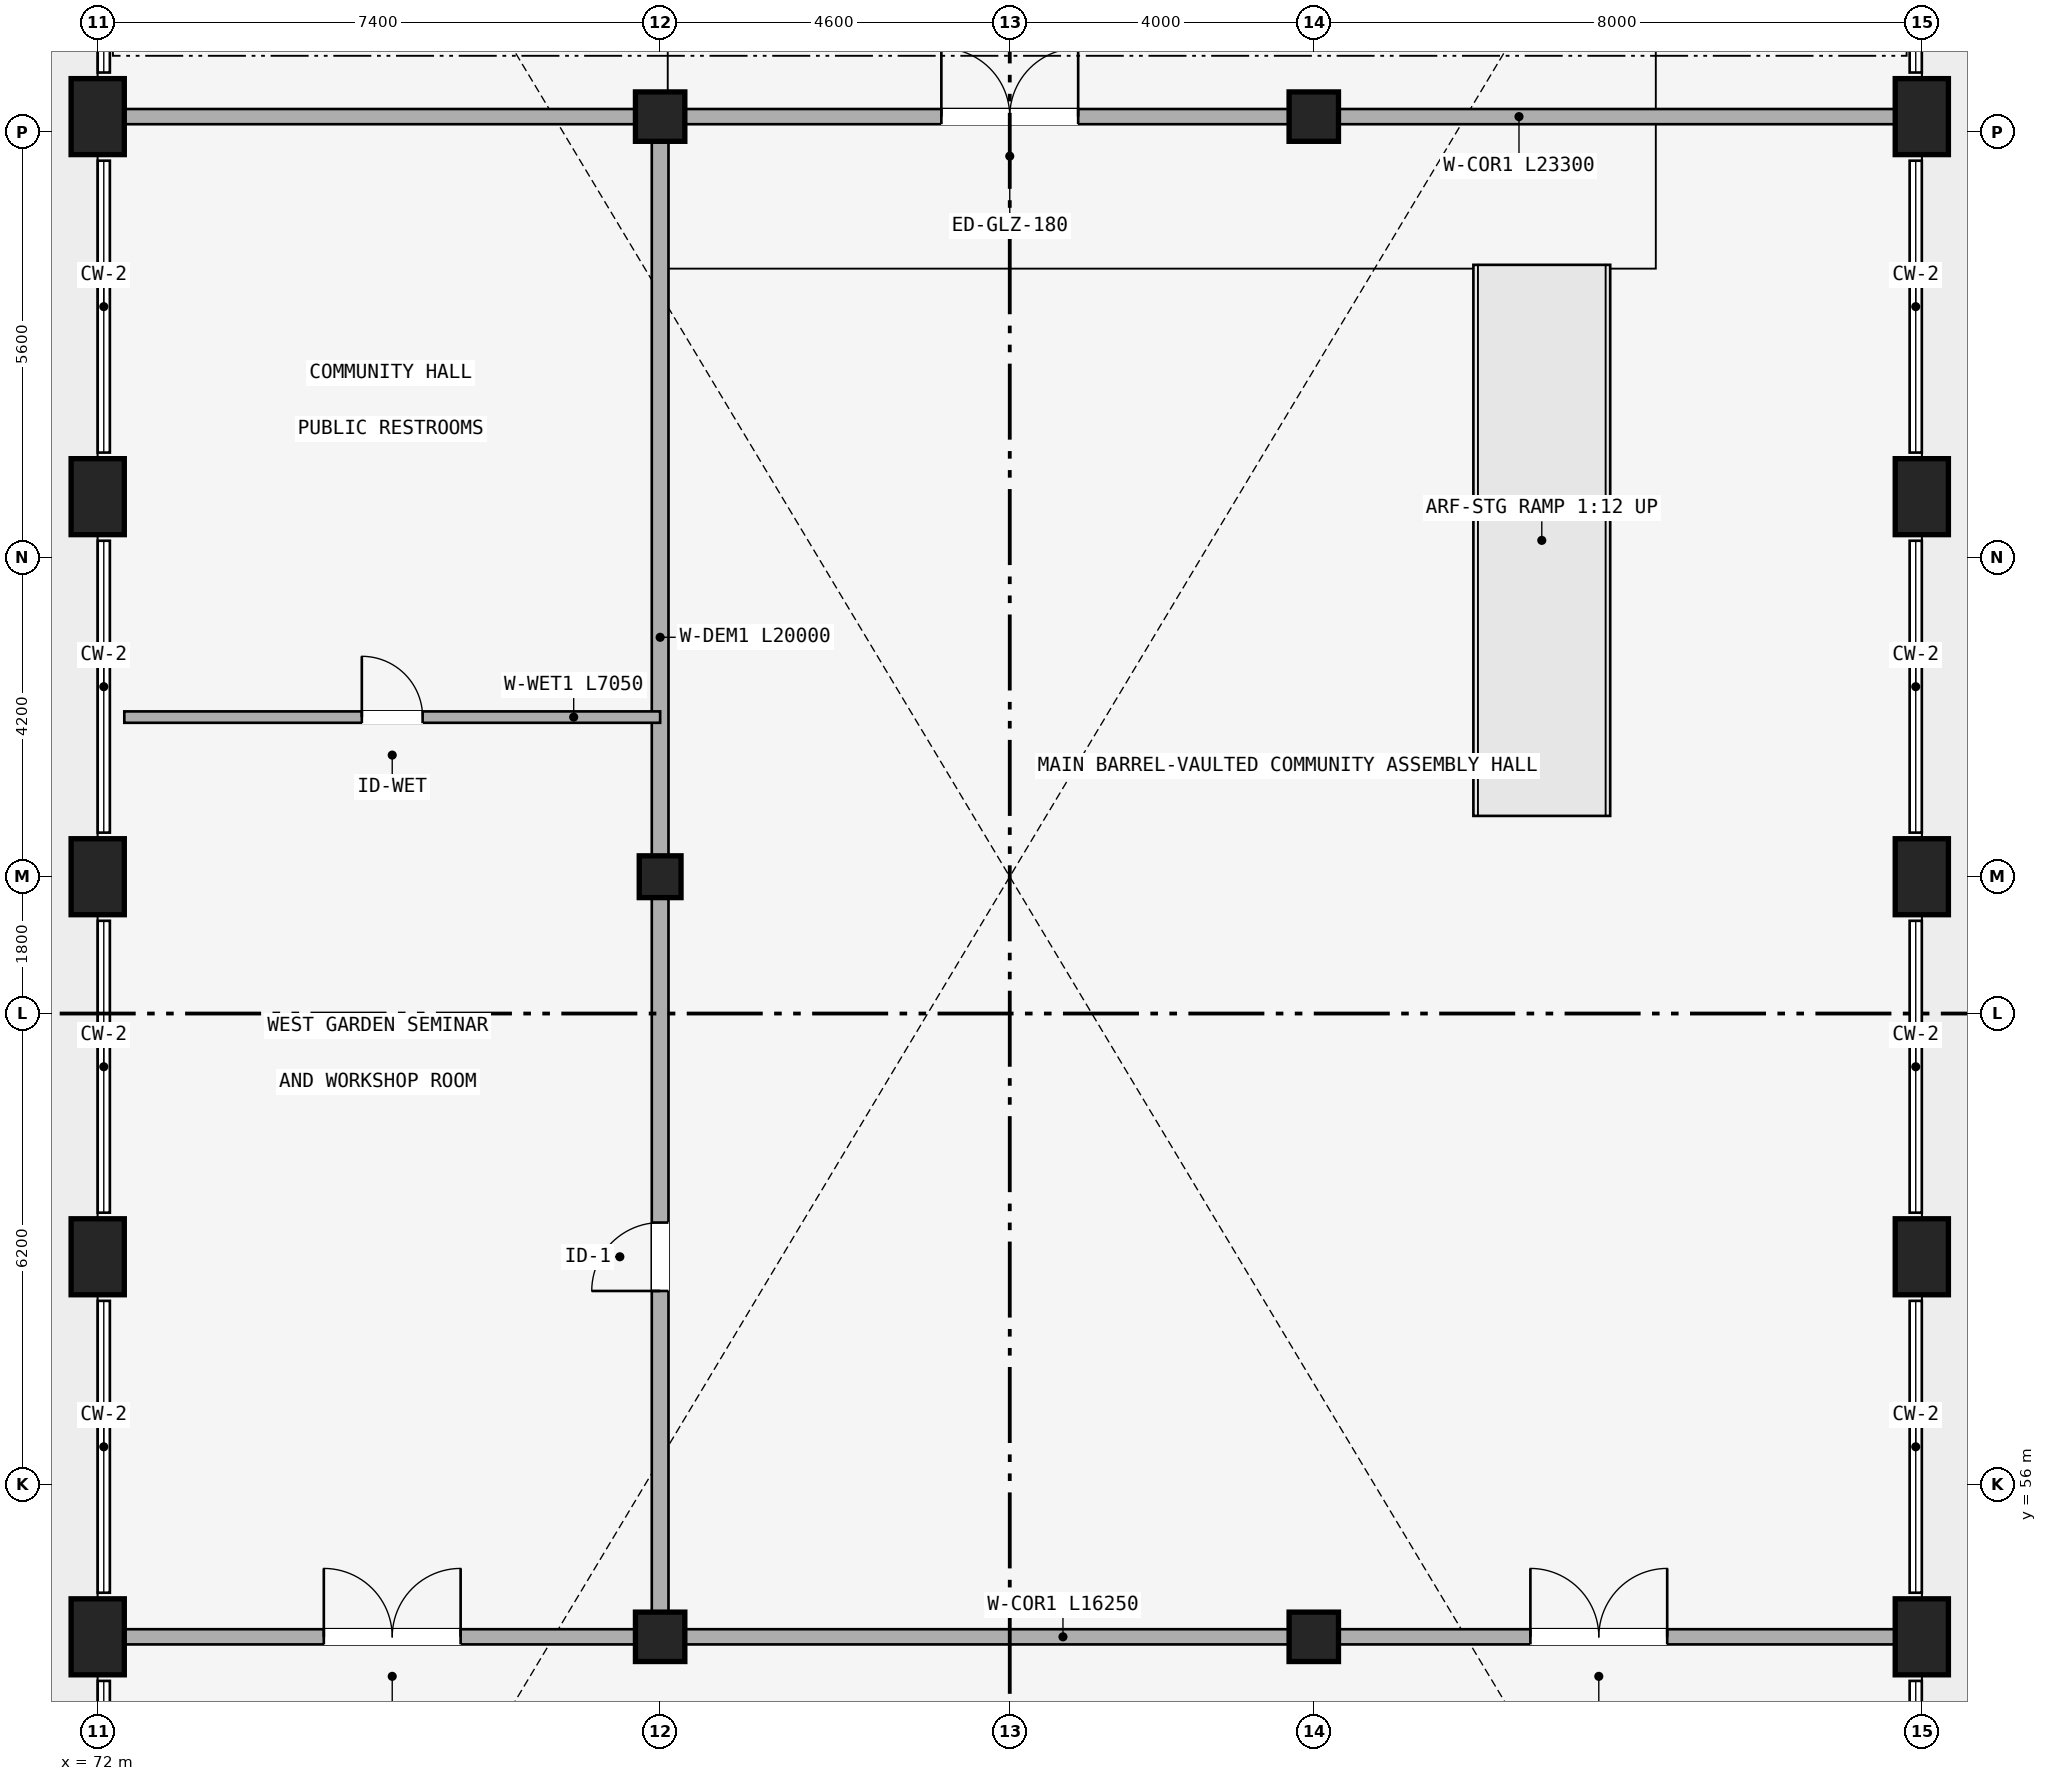
"""IFC4 building model, lengths in metres.
Left out: names, types, materials, properties, quantities, classifications, styles, units other than length and angle.
Written with IfcOpenShell. Run it as: python <this file> out.ifc"""

import sys

from ifc_helpers import new_model, si_unit, direction, frame, frame_2d, origin, origin_2d, place, context, subcontext, project, spatial, rectangle, extrude, element, fill, save


model = new_model("IFC4")
c1 = context("Model", 3, precision=1e-05, world=origin(), true_north=direction((0.0, 1.0)))
c2 = subcontext(c1, "Body", "Model", "MODEL_VIEW")
j1 = project(units=[si_unit("LENGTHUNIT", "METRE"), si_unit("PLANEANGLEUNIT", "RADIAN")], contexts=[c1])
p1 = place(None, origin())
s1 = spatial("IfcSite", under=j1, at=p1, CompositionType="ELEMENT")
p2 = place(p1, origin())
s2 = spatial("IfcBuilding", under=s1, at=p2, CompositionType="ELEMENT")
p3 = place(p2, origin())
s3 = spatial("IfcBuildingStorey", under=s2, at=p3, CompositionType="ELEMENT", Elevation=0.0)
for number, where, z_axis, x_axis in (
    (1, (72.0, 54.0, 0.0), (0.0, 0.0, 1.0), (1.0, 0.0, 0.0)),
    (2, (96.0, 54.0, 0.0), (0.0, 0.0, 1.0), (1.0, 0.0, 0.0)),
    (3, (72.0, 59.0, 0.0), (0.0, 0.0, 1.0), (1.0, 0.0, 0.0)),
    (4, (96.0, 59.0, 0.0), (0.0, 0.0, 1.0), (1.0, 0.0, 0.0)),
    (5, (72.0, 64.0, 0.0), (0.0, 0.0, 1.0), (1.0, 0.0, 0.0)),
    (6, (96.0, 64.0, 0.0), (0.0, 0.0, 1.0), (1.0, 0.0, 0.0)),
    (7, (72.0, 69.0, 0.0), (0.0, 0.0, 1.0), (1.0, 0.0, 0.0)),
    (8, (96.0, 69.0, 0.0), (0.0, 0.0, 1.0), (1.0, 0.0, 0.0)),
    (9, (72.0, 74.0, 0.0), (0.0, 0.0, 1.0), (1.0, 0.0, 0.0)),
    (10, (96.0, 74.0, 0.0), (0.0, 0.0, 1.0), (1.0, 0.0, 0.0)),
):
    element("IfcColumn", number, at=place(p3, frame(where, z_axis=z_axis, x_axis=x_axis)), inside=s3, PredefinedType="COLUMN", context=c2, shape_type="SweptSolid", body=[
        extrude(rectangle(XDim=0.7, YDim=1.0, at=origin_2d()), origin(), (0.0, 0.0, 1.0), 4.5),
    ])
for number, where, z_axis, x_axis in (
    (11, (79.4, 54.0, 0.0), (0.0, 0.0, 1.0), (1.0, 0.0, 0.0)),
    (12, (88.0, 54.0, 0.0), (0.0, 0.0, 1.0), (1.0, 0.0, 0.0)),
    (13, (79.4, 74.0, 0.0), (0.0, 0.0, 1.0), (1.0, 0.0, 0.0)),
    (14, (88.0, 74.0, 0.0), (0.0, 0.0, 1.0), (1.0, 0.0, 0.0)),
):
    element("IfcColumn", number, at=place(p3, frame(where, z_axis=z_axis, x_axis=x_axis)), inside=s3, PredefinedType="COLUMN", context=c2, shape_type="SweptSolid", body=[
        extrude(rectangle(XDim=0.65, YDim=0.65, at=origin_2d()), origin(), (0.0, 0.0, 1.0), 4.25),
    ])
p4 = place(p3, frame((79.4, 64.0, 0.0), z_axis=(0.0, 0.0, 1.0), x_axis=(1.0, 0.0, 0.0)))
e15 = element("IfcColumn", 15, at=p4, inside=s3, PredefinedType="COLUMN", context=c2, shape_type="SweptSolid", body=[
    extrude(rectangle(XDim=0.55, YDim=0.55, at=origin_2d()), origin(), (0.0, 0.0, 1.0), 4.25),
])
p5 = place(p3, frame((72.35, 54.0, 0.0), z_axis=(0.0, 0.0, 1.0), x_axis=(1.0, 0.0, 0.0)))
e16 = element("IfcWall", 16, at=p5, inside=s3, PredefinedType="STANDARD", context=c2, shape_type="SweptSolid", body=[
    extrude(rectangle(XDim=7.05, YDim=0.2, at=frame_2d((3.525, 0.0))), origin(), (0.0, 0.0, 1.0), 3.492),
])
p6 = place(p5, frame((2.625, 0.0, 0.0)))
e17 = element("IfcOpeningElement", 17, at=p6, cuts=e16, PredefinedType="OPENING", context=c2, shape_type="SweptSolid", body=[
    extrude(rectangle(XDim=1.8, YDim=2.2, at=frame_2d((0.9, 1.1))), frame((0.0, 0.11, 0.0), z_axis=(0.0, -1.0, 0.0), x_axis=(1.0, 0.0, 0.0)), (0.0, 0.0, 1.0), 0.22),
])
p7 = place(p3, frame((79.4, 54.0, 0.0), z_axis=(0.0, 0.0, 1.0), x_axis=(1.0, 0.0, 0.0)))
e18 = element("IfcWall", 18, at=p7, inside=s3, PredefinedType="STANDARD", context=c2, shape_type="SweptSolid", body=[
    extrude(rectangle(XDim=16.25, YDim=0.2, at=frame_2d((8.125, 0.0))), origin(), (0.0, 0.0, 1.0), 3.492),
])
p8 = place(p7, frame((11.45, 0.0, 0.0)))
e19 = element("IfcOpeningElement", 19, at=p8, cuts=e18, PredefinedType="OPENING", context=c2, shape_type="SweptSolid", body=[
    extrude(rectangle(XDim=1.8, YDim=2.2, at=frame_2d((0.9, 1.1))), frame((0.0, 0.11, 0.0), z_axis=(0.0, -1.0, 0.0), x_axis=(1.0, 0.0, 0.0)), (0.0, 0.0, 1.0), 0.22),
])
p9 = place(p3, frame((79.4, 54.0, 0.0), z_axis=(0.0, 0.0, 1.0), x_axis=(0.0, 1.0, 0.0)))
e20 = element("IfcWall", 20, at=p9, inside=s3, PredefinedType="STANDARD", context=c2, shape_type="SweptSolid", body=[
    extrude(rectangle(XDim=20.0, YDim=0.22, at=frame_2d((10.0, 0.0))), origin(), (0.0, 0.0, 1.0), 3.492),
])
p10 = place(p9, frame((4.55, 0.0, 0.0)))
e21 = element("IfcOpeningElement", 21, at=p10, cuts=e20, PredefinedType="OPENING", context=c2, shape_type="SweptSolid", body=[
    extrude(rectangle(XDim=0.9, YDim=2.1, at=frame_2d((0.45, 1.05))), frame((0.0, 0.12, 0.0), z_axis=(0.0, -1.0, 0.0), x_axis=(1.0, 0.0, 0.0)), (0.0, 0.0, 1.0), 0.24),
])
p11 = place(p3, frame((72.35, 66.1, 0.0), z_axis=(0.0, 0.0, 1.0), x_axis=(1.0, 0.0, 0.0)))
e22 = element("IfcWall", 22, at=p11, inside=s3, PredefinedType="PLUMBINGWALL", context=c2, shape_type="SweptSolid", body=[
    extrude(rectangle(XDim=7.05, YDim=0.15, at=frame_2d((3.525, 0.0))), origin(), (0.0, 0.0, 1.0), 3.492),
])
p12 = place(p11, frame((3.125, 0.0, 0.0)))
e23 = element("IfcOpeningElement", 23, at=p12, cuts=e22, PredefinedType="OPENING", context=c2, shape_type="SweptSolid", body=[
    extrude(rectangle(XDim=0.8, YDim=2.1, at=frame_2d((0.4, 1.05))), frame((0.0, 0.085, 0.0), z_axis=(0.0, -1.0, 0.0), x_axis=(1.0, 0.0, 0.0)), (0.0, 0.0, 1.0), 0.17),
])
p13 = place(p3, frame((72.35, 74.0, 0.0), z_axis=(0.0, 0.0, 1.0), x_axis=(1.0, 0.0, 0.0)))
e24 = element("IfcWall", 24, at=p13, inside=s3, PredefinedType="STANDARD", context=c2, shape_type="SweptSolid", body=[
    extrude(rectangle(XDim=23.3, YDim=0.2, at=frame_2d((11.65, 0.0))), origin(), (0.0, 0.0, 1.0), 3.492),
])
p14 = place(p13, frame((10.75, 0.0, 0.0)))
e25 = element("IfcOpeningElement", 25, at=p14, cuts=e24, PredefinedType="OPENING", context=c2, shape_type="SweptSolid", body=[
    extrude(rectangle(XDim=1.8, YDim=2.2, at=frame_2d((0.9, 1.1))), frame((0.0, 0.11, 0.0), z_axis=(0.0, -1.0, 0.0), x_axis=(1.0, 0.0, 0.0)), (0.0, 0.0, 1.0), 0.22),
])
p15 = place(p6, origin())
e26 = element("IfcDoor", 26, at=p15, inside=s3, OperationType="DOUBLE_DOOR_SINGLE_SWING", PredefinedType="DOOR", context=c2, shape_type="SweptSolid", body=[
    extrude(rectangle(XDim=1.8, YDim=2.2, at=frame_2d((0.9, 1.1))), frame((0.0, 0.025, 0.0), z_axis=(0.0, -1.0, 0.0), x_axis=(1.0, 0.0, 0.0)), (0.0, 0.0, 1.0), 0.05),
])
fill(e17, e26)
p16 = place(p8, origin())
e27 = element("IfcDoor", 27, at=p16, inside=s3, OperationType="DOUBLE_DOOR_SINGLE_SWING", PredefinedType="DOOR", context=c2, shape_type="SweptSolid", body=[
    extrude(rectangle(XDim=1.8, YDim=2.2, at=frame_2d((0.9, 1.1))), frame((0.0, 0.025, 0.0), z_axis=(0.0, -1.0, 0.0), x_axis=(1.0, 0.0, 0.0)), (0.0, 0.0, 1.0), 0.05),
])
fill(e19, e27)
p17 = place(p10, frame((0.9, 0.0, 0.0), z_axis=(0.0, 0.0, 1.0), x_axis=(-1.0, 0.0, 0.0)))
e28 = element("IfcDoor", 28, at=p17, inside=s3, OperationType="SINGLE_SWING_RIGHT", PredefinedType="DOOR", context=c2, shape_type="SweptSolid", body=[
    extrude(rectangle(XDim=0.9, YDim=2.1, at=frame_2d((0.45, 1.05))), frame((0.0, 0.025, 0.0), z_axis=(0.0, -1.0, 0.0), x_axis=(1.0, 0.0, 0.0)), (0.0, 0.0, 1.0), 0.05),
])
fill(e21, e28)
p18 = place(p12, origin())
e29 = element("IfcDoor", 29, at=p18, inside=s3, OperationType="SINGLE_SWING_LEFT", PredefinedType="DOOR", context=c2, shape_type="SweptSolid", body=[
    extrude(rectangle(XDim=0.8, YDim=2.1, at=frame_2d((0.4, 1.05))), frame((0.0, 0.025, 0.0), z_axis=(0.0, -1.0, 0.0), x_axis=(1.0, 0.0, 0.0)), (0.0, 0.0, 1.0), 0.05),
])
fill(e23, e29)
p19 = place(p14, origin())
e30 = element("IfcDoor", 30, at=p19, inside=s3, OperationType="DOUBLE_DOOR_SINGLE_SWING", PredefinedType="DOOR", context=c2, shape_type="SweptSolid", body=[
    extrude(rectangle(XDim=1.8, YDim=2.2, at=frame_2d((0.9, 1.1))), frame((0.0, 0.025, 0.0), z_axis=(0.0, -1.0, 0.0), x_axis=(1.0, 0.0, 0.0)), (0.0, 0.0, 1.0), 0.05),
])
fill(e25, e30)
save(model, sys.argv[1])
